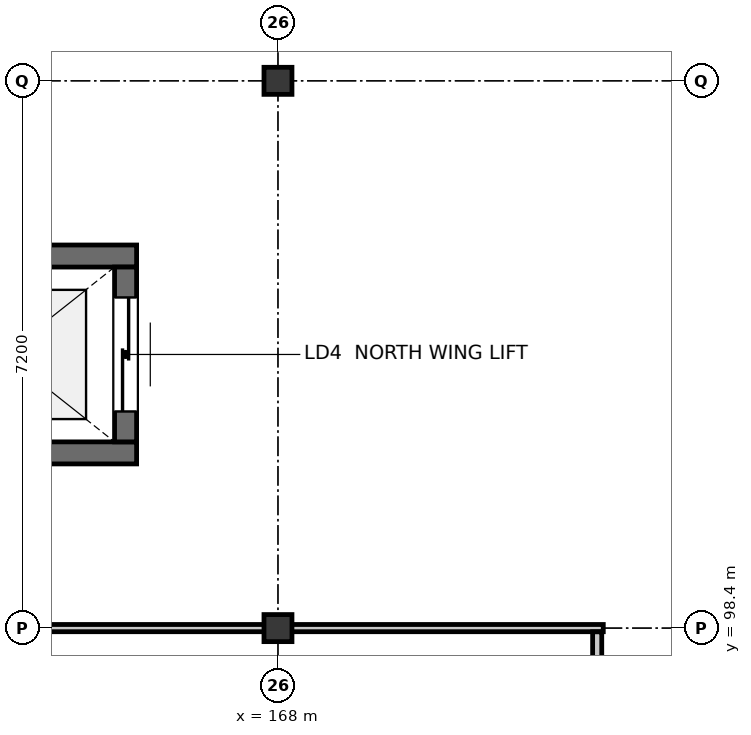
"""IFC4 building model, lengths in metres.
Left out: names, types, materials, properties, quantities, classifications, styles, units other than length and angle.
Written with IfcOpenShell. Run it as: python <this file> out.ifc"""

import sys

from ifc_helpers import new_model, si_unit, direction, frame, frame_2d, origin, origin_2d, place, context, subcontext, project, spatial, rectangle, i_section, extrude, element, fill, save


model = new_model("IFC4")
c1 = context("Model", 3, precision=1e-05, world=origin(), true_north=direction((0.0, 1.0)))
c2 = subcontext(c1, "Body", "Model", "MODEL_VIEW")
j1 = project(units=[si_unit("LENGTHUNIT", "METRE"), si_unit("PLANEANGLEUNIT", "RADIAN")], contexts=[c1])
p1 = place(None, origin())
s1 = spatial("IfcSite", under=j1, at=p1, CompositionType="ELEMENT")
p2 = place(p1, origin())
s2 = spatial("IfcBuilding", under=s1, at=p2, CompositionType="ELEMENT")
p3 = place(p2, frame((0.0, 0.0, 9.3)))
s3 = spatial("IfcBuildingStorey", under=s2, at=p3, CompositionType="ELEMENT", Elevation=9.3)
for number, where, z_axis, x_axis in (
    (1, (168.0, 98.4, 0.0), (0.0, 0.0, 1.0), (1.0, 0.0, 0.0)),
    (2, (168.0, 105.6, 0.0), (0.0, 0.0, 1.0), (1.0, 0.0, 0.0)),
):
    element("IfcColumn", number, at=place(p3, frame(where, z_axis=z_axis, x_axis=x_axis)), inside=s3, PredefinedType="COLUMN", context=c2, shape_type="SweptSolid", body=[
        extrude(i_section(OverallWidth=0.368, OverallDepth=0.356, WebThickness=0.011, FlangeThickness=0.018, FilletRadius=0.015, at=origin_2d()), origin(), (0.0, 0.0, 1.0), 3.9),
    ])
for number, where, z_axis, x_axis in (
    (3, (166.14, 100.705, 0.0), (0.0, 0.0, 1.0), (-1.0, 0.0, 0.0)),
    (4, (162.66, 103.295, 0.0), (0.0, 0.0, 1.0), (1.0, 0.0, 0.0)),
):
    element("IfcWall", number, at=place(p3, frame(where, z_axis=z_axis, x_axis=x_axis)), inside=s3, PredefinedType="SHEAR", context=c2, shape_type="SweptSolid", body=[
        extrude(rectangle(XDim=3.48, YDim=0.29, at=frame_2d((1.74, 0.0))), origin(), (0.0, 0.0, 1.0), 3.6),
    ])
p4 = place(p3, frame((165.995, 103.15, 0.0), z_axis=(0.0, 0.0, 1.0), x_axis=(0.0, -1.0, 0.0)))
e5 = element("IfcWall", 5, at=p4, inside=s3, PredefinedType="SHEAR", context=c2, shape_type="SweptSolid", body=[
    extrude(rectangle(XDim=2.3, YDim=0.29, at=frame_2d((1.15, 0.0))), origin(), (0.0, 0.0, 1.0), 3.6),
])
p5 = place(p4, frame((0.4, 0.0, 0.0)))
e6 = element("IfcOpeningElement", 6, at=p5, cuts=e5, PredefinedType="OPENING", context=c2, shape_type="SweptSolid", body=[
    extrude(rectangle(XDim=1.5, YDim=2.3, at=frame_2d((0.75, 1.15))), frame((0.0, 0.155, 0.0), z_axis=(0.0, -1.0, 0.0), x_axis=(1.0, 0.0, 0.0)), (0.0, 0.0, 1.0), 0.31),
])
p6 = place(p3, frame((153.732, 98.4, 0.0), z_axis=(0.0, 0.0, 1.0), x_axis=(1.0, 0.0, 0.0)))
e7 = element("IfcWall", 7, at=p6, inside=s3, PredefinedType="PARTITIONING", context=c2, shape_type="SweptSolid", body=[
    extrude(rectangle(XDim=18.548, YDim=0.095, at=frame_2d((9.274, 0.0))), origin(), (0.0, 0.0, 1.0), 2.823),
])
p7 = place(p3, frame((172.2, 98.351, 0.0), z_axis=(0.0, 0.0, 1.0), x_axis=(0.0, -1.0, 0.0)))
e8 = element("IfcWall", 8, at=p7, inside=s3, PredefinedType="PARTITIONING", context=c2, shape_type="SweptSolid", body=[
    extrude(rectangle(XDim=21.414, YDim=0.12, at=frame_2d((10.707, 0.0))), origin(), (0.0, 0.0, 1.0), 2.823),
])
p8 = place(p7, frame((10.237, 0.0, 0.0)))
e9 = element("IfcOpeningElement", 9, at=p8, cuts=e8, PredefinedType="OPENING", context=c2, shape_type="SweptSolid", body=[
    extrude(rectangle(XDim=0.94, YDim=2.1, at=frame_2d((0.47, 1.05))), frame((0.0, 0.07, 0.0), z_axis=(0.0, -1.0, 0.0), x_axis=(1.0, 0.0, 0.0)), (0.0, 0.0, 1.0), 0.14),
])
p9 = place(p5, origin())
e10 = element("IfcDoor", 10, at=p9, inside=s3, OperationType="DOUBLE_DOOR_SLIDING", PredefinedType="DOOR", context=c2, shape_type="SweptSolid", body=[
    extrude(rectangle(XDim=1.5, YDim=2.3, at=frame_2d((0.75, 1.15))), frame((0.0, 0.025, 0.0), z_axis=(0.0, -1.0, 0.0), x_axis=(1.0, 0.0, 0.0)), (0.0, 0.0, 1.0), 0.05),
])
fill(e6, e10)
save(model, sys.argv[1])
